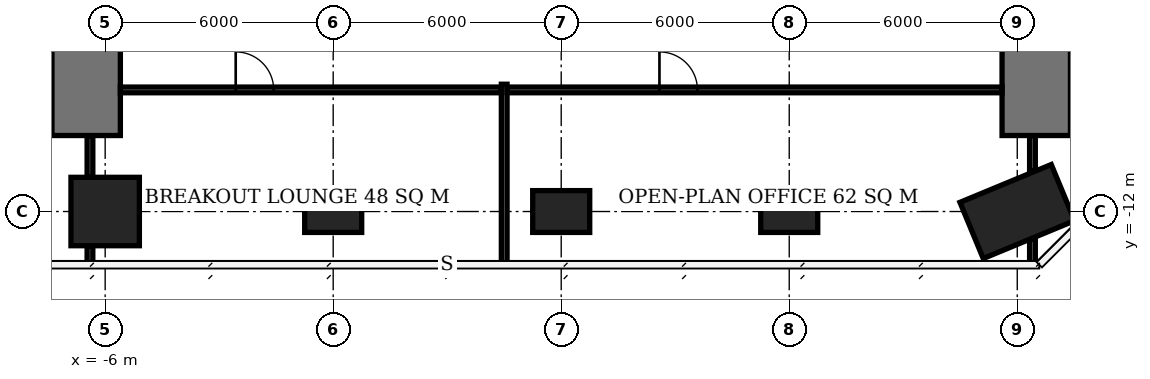
"""IFC4 building model, lengths in metres.
Left out: names, types, materials, properties, quantities, classifications, styles, units other than length and angle.
Written with IfcOpenShell. Run it as: python <this file> out.ifc"""

import sys

from ifc_helpers import new_model, si_unit, direction, frame, frame_2d, origin, origin_2d, place, context, subcontext, project, spatial, rectangle, extrude, element, fill, save


model = new_model("IFC4")
c1 = context("Model", 3, precision=1e-05, world=origin(), true_north=direction((0.0, 1.0)))
c2 = subcontext(c1, "Body", "Model", "MODEL_VIEW")
j1 = project(units=[si_unit("LENGTHUNIT", "METRE"), si_unit("PLANEANGLEUNIT", "RADIAN")], contexts=[c1])
p1 = place(None, origin())
s1 = spatial("IfcSite", under=j1, at=p1, CompositionType="ELEMENT")
p2 = place(p1, origin())
s2 = spatial("IfcBuilding", under=s1, at=p2, CompositionType="ELEMENT")
p3 = place(p2, frame((0.0, 0.0, 192.8)))
s3 = spatial("IfcBuildingStorey", under=s2, at=p3, CompositionType="ELEMENT", Elevation=192.8)
p4 = place(p3, frame((-6.0, -12.0, 0.0), z_axis=(0.0, 0.0, 1.0), x_axis=(1.0, 0.0, 0.0)))
e1 = element("IfcColumn", 1, at=p4, inside=s3, PredefinedType="COLUMN", context=c2, shape_type="SweptSolid", body=[
    extrude(rectangle(XDim=1.8, YDim=1.8, at=origin_2d()), origin(), (0.0, 0.0, 1.0), 3.9),
])
for number, where, z_axis, x_axis in (
    (2, (0.0, -12.0, 0.0), (0.0, 0.0, 1.0), (1.0, 0.0, 0.0)),
    (3, (6.0, -12.0, 0.0), (0.0, 0.0, 1.0), (1.0, 0.0, 0.0)),
    (4, (12.0, -12.0, 0.0), (0.0, 0.0, 1.0), (1.0, 0.0, 0.0)),
):
    element("IfcColumn", number, at=place(p3, frame(where, z_axis=z_axis, x_axis=x_axis)), inside=s3, PredefinedType="COLUMN", context=c2, shape_type="SweptSolid", body=[
        extrude(rectangle(XDim=1.5, YDim=1.1, at=origin_2d()), origin(), (0.0, 0.0, 1.0), 3.9),
    ])
p5 = place(p3, frame((18.0, -12.0, 0.0), z_axis=(0.0, 0.0, 1.0), x_axis=(-0.923879532511, -0.382683432365, 0.0)))
e5 = element("IfcColumn", 5, at=p5, inside=s3, PredefinedType="COLUMN", context=c2, shape_type="SweptSolid", body=[
    extrude(rectangle(XDim=2.6, YDim=1.6, at=origin_2d()), origin(), (0.0, 0.0, 1.0), 3.9),
])
for number, where, z_axis, x_axis in (
    (6, (-6.5, -10.0, 0.0), (0.0, 0.0, 1.0), (0.0, 1.0, 0.0)),
    (7, (18.5, -10.0, 0.0), (0.0, 0.0, 1.0), (0.0, 1.0, 0.0)),
):
    element("IfcWall", number, at=place(p3, frame(where, z_axis=z_axis, x_axis=x_axis)), inside=s3, PredefinedType="SHEAR", context=c2, shape_type="SweptSolid", body=[
        extrude(rectangle(XDim=2.4, YDim=1.8, at=frame_2d((1.2, 0.0))), origin(), (0.0, 0.0, 1.0), 3.9),
    ])
p6 = place(p3, frame((-6.4, -13.35, 0.0), z_axis=(0.0, 0.0, 1.0), x_axis=(0.0, 1.0, 0.0)))
e8 = element("IfcWall", 8, at=p6, inside=s3, PredefinedType="PARTITIONING", context=c2, shape_type="SweptSolid", body=[
    extrude(rectangle(XDim=0.45, YDim=0.15, at=frame_2d((0.225, 0.0))), origin(), (0.0, 0.0, 1.0), 3.65),
])
p7 = place(p3, frame((-6.4, -11.1, 0.0), z_axis=(0.0, 0.0, 1.0), x_axis=(0.0, 1.0, 0.0)))
e9 = element("IfcWall", 9, at=p7, inside=s3, PredefinedType="PARTITIONING", context=c2, shape_type="SweptSolid", body=[
    extrude(rectangle(XDim=1.1, YDim=0.15, at=frame_2d((0.55, 0.0))), origin(), (0.0, 0.0, 1.0), 3.65),
])
p8 = place(p3, frame((-5.6, -8.8, 0.0), z_axis=(0.0, 0.0, 1.0), x_axis=(1.0, 0.0, 0.0)))
e10 = element("IfcWall", 10, at=p8, inside=s3, PredefinedType="PARTITIONING", context=c2, shape_type="SweptSolid", body=[
    extrude(rectangle(XDim=10.025, YDim=0.15, at=frame_2d((5.013, 0.0))), origin(), (0.0, 0.0, 1.0), 3.65),
])
p9 = place(p8, frame((3.035, 0.0, 0.0)))
e11 = element("IfcOpeningElement", 11, at=p9, cuts=e10, PredefinedType="OPENING", context=c2, shape_type="SweptSolid", body=[
    extrude(rectangle(XDim=1.0, YDim=2.1, at=frame_2d((0.5, 1.05))), frame((0.0, 0.085, 0.0), z_axis=(0.0, -1.0, 0.0), x_axis=(1.0, 0.0, 0.0)), (0.0, 0.0, 1.0), 0.17),
])
p10 = place(p3, frame((4.5, -13.4, 0.0), z_axis=(0.0, 0.0, 1.0), x_axis=(0.0, 1.0, 0.0)))
e12 = element("IfcWall", 12, at=p10, inside=s3, PredefinedType="PARTITIONING", context=c2, shape_type="SweptSolid", body=[
    extrude(rectangle(XDim=4.75, YDim=0.15, at=frame_2d((2.375, 0.0))), origin(), (0.0, 0.0, 1.0), 3.65),
])
p11 = place(p3, frame((4.575, -8.8, 0.0), z_axis=(0.0, 0.0, 1.0), x_axis=(1.0, 0.0, 0.0)))
e13 = element("IfcWall", 13, at=p11, inside=s3, PredefinedType="PARTITIONING", context=c2, shape_type="SweptSolid", body=[
    extrude(rectangle(XDim=13.025, YDim=0.15, at=frame_2d((6.513, 0.0))), origin(), (0.0, 0.0, 1.0), 3.65),
])
p12 = place(p11, frame((4.01, 0.0, 0.0)))
e14 = element("IfcOpeningElement", 14, at=p12, cuts=e13, PredefinedType="OPENING", context=c2, shape_type="SweptSolid", body=[
    extrude(rectangle(XDim=1.0, YDim=2.1, at=frame_2d((0.5, 1.05))), frame((0.0, 0.085, 0.0), z_axis=(0.0, -1.0, 0.0), x_axis=(1.0, 0.0, 0.0)), (0.0, 0.0, 1.0), 0.17),
])
p13 = place(p3, frame((18.4, -13.4, 0.0), z_axis=(0.0, 0.0, 1.0), x_axis=(0.0, 1.0, 0.0)))
e15 = element("IfcWall", 15, at=p13, inside=s3, PredefinedType="PARTITIONING", context=c2, shape_type="SweptSolid", body=[
    extrude(rectangle(XDim=0.669, YDim=0.15, at=frame_2d((0.334, 0.0))), origin(), (0.0, 0.0, 1.0), 3.65),
])
p14 = place(p3, frame((18.4, -10.937, 0.0), z_axis=(0.0, 0.0, 1.0), x_axis=(0.0, 1.0, 0.0)))
e16 = element("IfcWall", 16, at=p14, inside=s3, PredefinedType="PARTITIONING", context=c2, shape_type="SweptSolid", body=[
    extrude(rectangle(XDim=0.937, YDim=0.15, at=frame_2d((0.469, 0.0))), origin(), (0.0, 0.0, 1.0), 3.65),
])
p15 = place(p9, origin())
e17 = element("IfcDoor", 17, at=p15, inside=s3, OperationType="SINGLE_SWING_LEFT", PredefinedType="DOOR", context=c2, shape_type="SweptSolid", body=[
    extrude(rectangle(XDim=1.0, YDim=2.1, at=frame_2d((0.5, 1.05))), frame((0.0, 0.025, 0.0), z_axis=(0.0, -1.0, 0.0), x_axis=(1.0, 0.0, 0.0)), (0.0, 0.0, 1.0), 0.05),
])
fill(e11, e17)
p16 = place(p12, origin())
e18 = element("IfcDoor", 18, at=p16, inside=s3, OperationType="SINGLE_SWING_LEFT", PredefinedType="DOOR", context=c2, shape_type="SweptSolid", body=[
    extrude(rectangle(XDim=1.0, YDim=2.1, at=frame_2d((0.5, 1.05))), frame((0.0, 0.025, 0.0), z_axis=(0.0, -1.0, 0.0), x_axis=(1.0, 0.0, 0.0)), (0.0, 0.0, 1.0), 0.05),
])
fill(e14, e18)
save(model, sys.argv[1])
